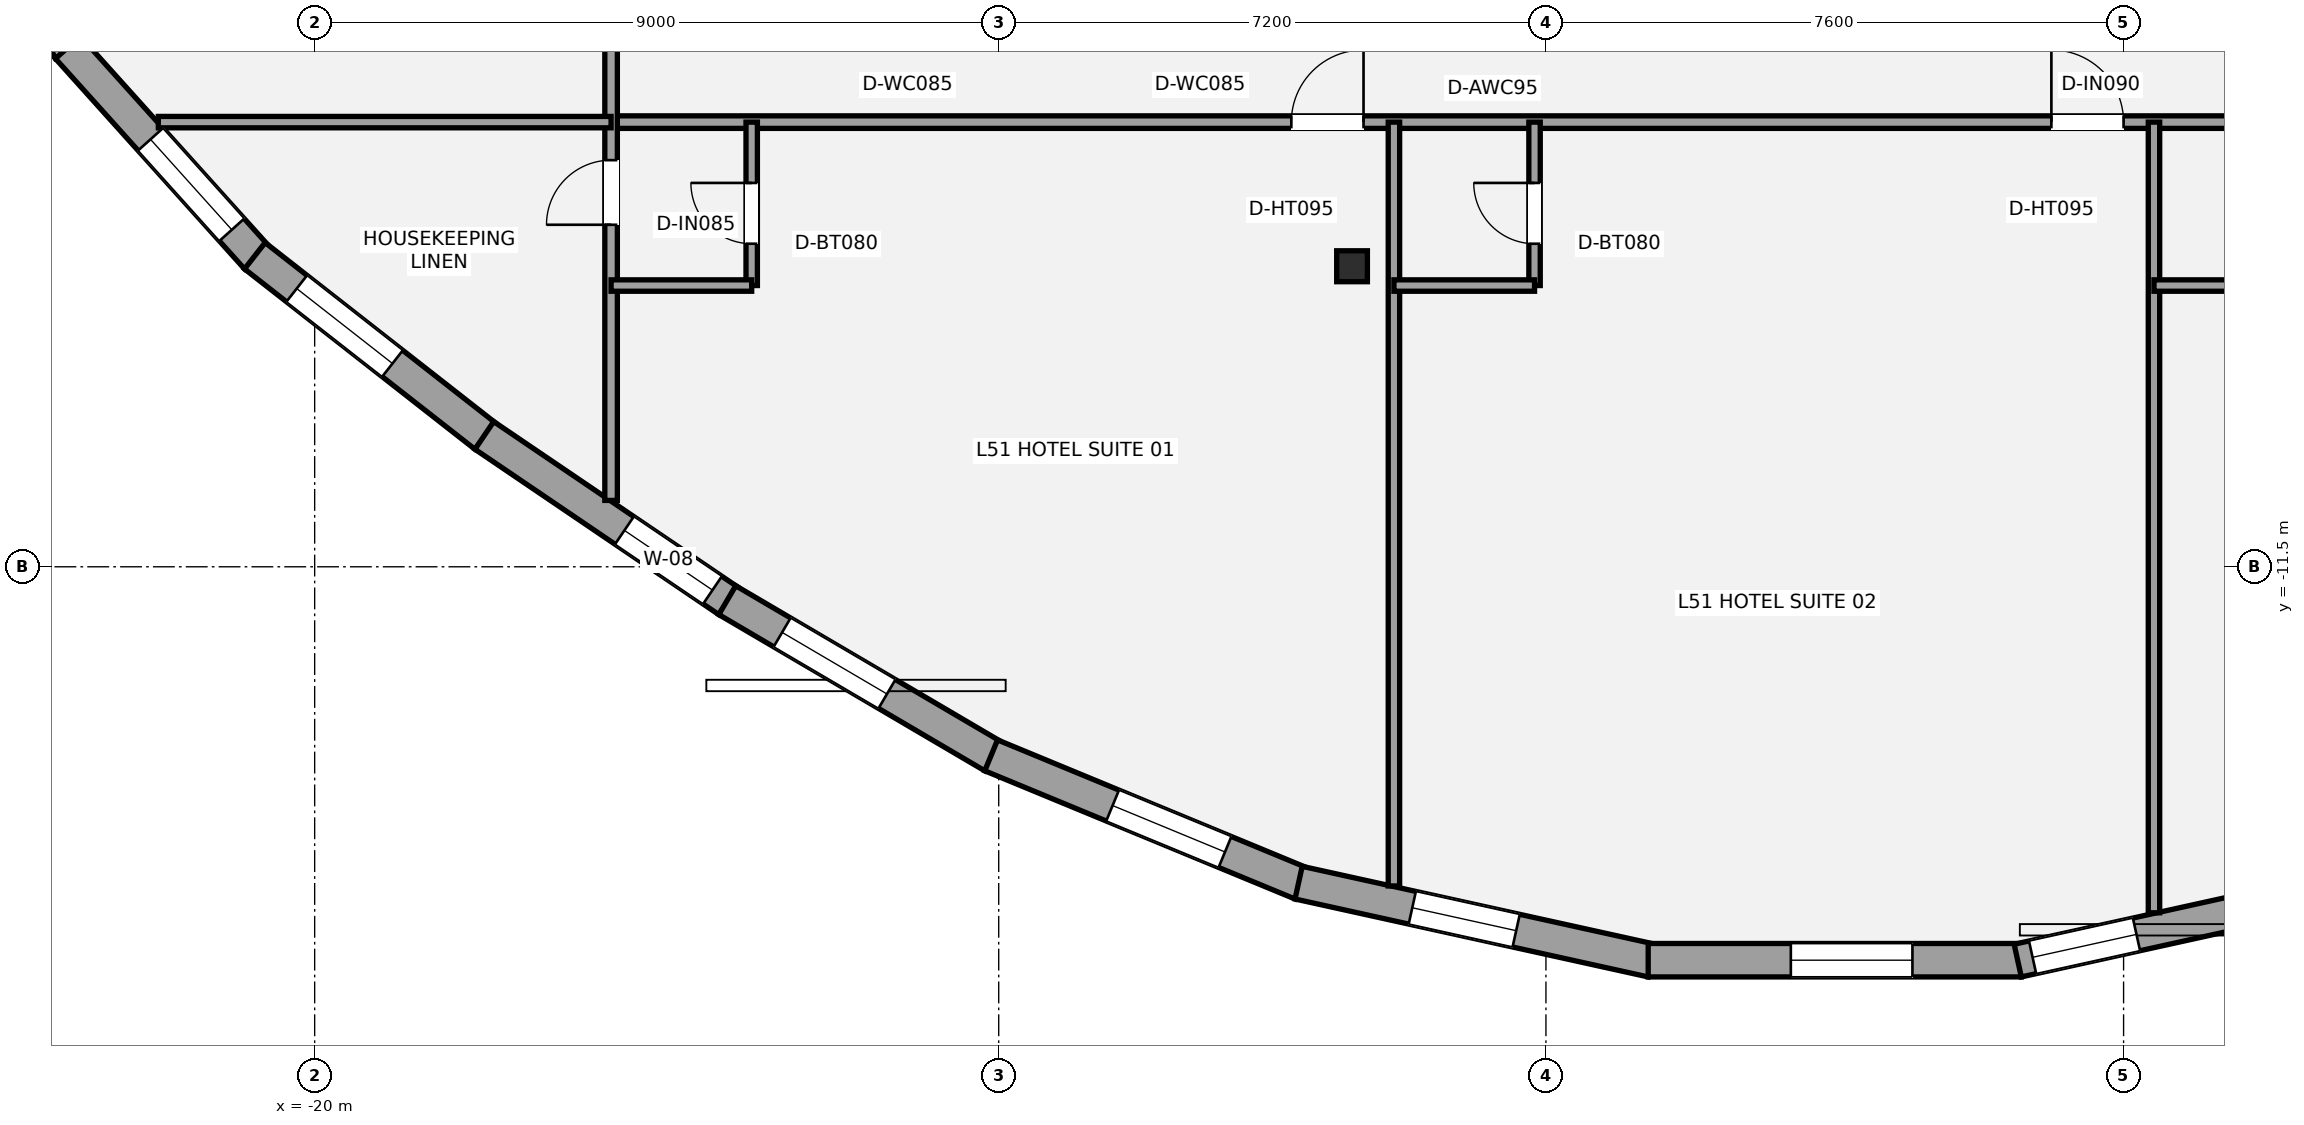
"""IFC4 building model, lengths in metres.
Left out: names, types, materials, properties, quantities, classifications, styles, units other than length and angle.
Written with IfcOpenShell. Run it as: python <this file> out.ifc"""

import sys

from ifc_helpers import new_model, si_unit, direction, frame, frame_2d, origin, origin_2d, place, context, subcontext, project, spatial, rectangle, i_section, extrude, element, fill, save


model = new_model("IFC4")
c1 = context("Model", 3, precision=1e-05, world=origin(), true_north=direction((0.0, 1.0)))
c2 = subcontext(c1, "Body", "Model", "MODEL_VIEW")
j1 = project(units=[si_unit("LENGTHUNIT", "METRE"), si_unit("PLANEANGLEUNIT", "RADIAN")], contexts=[c1])
p1 = place(None, origin())
s1 = spatial("IfcSite", under=j1, at=p1, CompositionType="ELEMENT")
p2 = place(p1, origin())
s2 = spatial("IfcBuilding", under=s1, at=p2, CompositionType="ELEMENT")
p3 = place(p2, frame((0.0, 0.0, 185.4)))
s3 = spatial("IfcBuildingStorey", under=s2, at=p3, CompositionType="ELEMENT", Elevation=185.4)
p4 = place(p3, frame((-6.351, -7.546, 0.0), z_axis=(0.0, 0.0, 1.0), x_axis=(1.0, 0.0, 0.0)))
e1 = element("IfcColumn", 1, at=p4, inside=s3, PredefinedType="COLUMN", context=c2, shape_type="SweptSolid", body=[
    extrude(i_section(OverallWidth=0.404, OverallDepth=0.407, WebThickness=0.027, FlangeThickness=0.044, at=origin_2d()), origin(), (0.0, 0.0, 1.0), 3.2),
])
p5 = place(p3, frame((-23.212, -4.719, 0.0), z_axis=(0.0, 0.0, 1.0), x_axis=(-0.43276286683, 0.90150779314, 0.0)))
e2 = element("IfcWall", 2, at=p5, inside=s3, PredefinedType="STANDARD", context=c2, shape_type="SweptSolid", body=[
    extrude(rectangle(XDim=3.494, YDim=0.44, at=frame_2d((1.747, 0.0))), origin(), (0.0, 0.0, 1.0), 2.315),
])
p6 = place(p5, frame((1.396, 0.0, 0.58)))
e3 = element("IfcOpeningElement", 3, at=p6, cuts=e2, PredefinedType="OPENING", context=c2, shape_type="SweptSolid", body=[
    extrude(rectangle(XDim=1.6, YDim=1.55, at=frame_2d((0.8, 0.775))), frame((0.0, 0.23, 0.0), z_axis=(0.0, -1.0, 0.0), x_axis=(1.0, 0.0, 0.0)), (0.0, 0.0, 1.0), 0.46),
])
p7 = place(p3, frame((-20.759, -7.435, 0.0), z_axis=(0.0, 0.0, 1.0), x_axis=(-0.668547778607, 0.743669192396, 0.0)))
e4 = element("IfcWall", 4, at=p7, inside=s3, PredefinedType="STANDARD", context=c2, shape_type="SweptSolid", body=[
    extrude(rectangle(XDim=3.721, YDim=0.44, at=frame_2d((1.861, 0.0))), origin(), (0.0, 0.0, 1.0), 2.315),
])
p8 = place(p7, frame((0.495, 0.0, 0.58)))
e5 = element("IfcOpeningElement", 5, at=p8, cuts=e4, PredefinedType="OPENING", context=c2, shape_type="SweptSolid", body=[
    extrude(rectangle(XDim=1.6, YDim=1.55, at=frame_2d((0.8, 0.775))), frame((0.0, 0.23, 0.0), z_axis=(0.0, -1.0, 0.0), x_axis=(1.0, 0.0, 0.0)), (0.0, 0.0, 1.0), 0.46),
])
p9 = place(p3, frame((-17.756, -9.781, 0.0), z_axis=(0.0, 0.0, 1.0), x_axis=(-0.787518383176, 0.616291161838, 0.0)))
e6 = element("IfcWall", 6, at=p9, inside=s3, PredefinedType="STANDARD", context=c2, shape_type="SweptSolid", body=[
    extrude(rectangle(XDim=3.85, YDim=0.44, at=frame_2d((1.925, 0.0))), origin(), (0.0, 0.0, 1.0), 2.315),
])
p10 = place(p9, frame((1.55, 0.0, 0.58)))
e7 = element("IfcOpeningElement", 7, at=p10, cuts=e6, PredefinedType="OPENING", context=c2, shape_type="SweptSolid", body=[
    extrude(rectangle(XDim=1.6, YDim=1.55, at=frame_2d((0.8, 0.775))), frame((0.0, 0.23, 0.0), z_axis=(0.0, -1.0, 0.0), x_axis=(1.0, 0.0, 0.0)), (0.0, 0.0, 1.0), 0.46),
])
p11 = place(p3, frame((-14.56, -11.947, 0.0), z_axis=(0.0, 0.0, 1.0), x_axis=(-0.82774221662, 0.561108565988, 0.0)))
e8 = element("IfcWall", 8, at=p11, inside=s3, PredefinedType="STANDARD", context=c2, shape_type="SweptSolid", body=[
    extrude(rectangle(XDim=3.876, YDim=0.44, at=frame_2d((1.938, 0.0))), origin(), (0.0, 0.0, 1.0), 2.315),
])
p12 = place(p11, frame((0.25, 0.0, 0.58)))
e9 = element("IfcOpeningElement", 9, at=p12, cuts=e8, PredefinedType="OPENING", context=c2, shape_type="SweptSolid", body=[
    extrude(rectangle(XDim=1.4, YDim=1.55, at=frame_2d((0.7, 0.775))), frame((0.0, 0.23, 0.0), z_axis=(0.0, -1.0, 0.0), x_axis=(1.0, 0.0, 0.0)), (0.0, 0.0, 1.0), 0.46),
])
p13 = place(p3, frame((-11.072, -13.995, 0.0), z_axis=(0.0, 0.0, 1.0), x_axis=(-0.862269598443, 0.506449542995, 0.0)))
e10 = element("IfcWall", 10, at=p13, inside=s3, PredefinedType="STANDARD", context=c2, shape_type="SweptSolid", body=[
    extrude(rectangle(XDim=4.059, YDim=0.44, at=frame_2d((2.029, 0.0))), origin(), (0.0, 0.0, 1.0), 2.315),
])
p14 = place(p13, frame((1.621, 0.0, 0.58)))
e11 = element("IfcOpeningElement", 11, at=p14, cuts=e10, PredefinedType="OPENING", context=c2, shape_type="SweptSolid", body=[
    extrude(rectangle(XDim=1.6, YDim=1.55, at=frame_2d((0.8, 0.775))), frame((0.0, 0.23, 0.0), z_axis=(0.0, -1.0, 0.0), x_axis=(1.0, 0.0, 0.0)), (0.0, 0.0, 1.0), 0.46),
])
p15 = place(p3, frame((-7.018, -15.667, 0.0), z_axis=(0.0, 0.0, 1.0), x_axis=(-0.924224109839, 0.381850487486, 0.0)))
e12 = element("IfcWall", 12, at=p15, inside=s3, PredefinedType="STANDARD", context=c2, shape_type="SweptSolid", body=[
    extrude(rectangle(XDim=4.417, YDim=0.44, at=frame_2d((2.208, 0.0))), origin(), (0.0, 0.0, 1.0), 2.315),
])
p16 = place(p15, frame((1.088, 0.0, 0.58)))
e13 = element("IfcOpeningElement", 13, at=p16, cuts=e12, PredefinedType="OPENING", context=c2, shape_type="SweptSolid", body=[
    extrude(rectangle(XDim=1.6, YDim=1.55, at=frame_2d((0.8, 0.775))), frame((0.0, 0.23, 0.0), z_axis=(0.0, -1.0, 0.0), x_axis=(1.0, 0.0, 0.0)), (0.0, 0.0, 1.0), 0.46),
])
p17 = place(p3, frame((-2.407, -16.681, 0.0), z_axis=(0.0, 0.0, 1.0), x_axis=(-0.976520281828, 0.215425484049, 0.0)))
e14 = element("IfcWall", 14, at=p17, inside=s3, PredefinedType="STANDARD", context=c2, shape_type="SweptSolid", body=[
    extrude(rectangle(XDim=4.759, YDim=0.44, at=frame_2d((2.379, 0.0))), origin(), (0.0, 0.0, 1.0), 2.315),
])
p18 = place(p17, frame((1.827, 0.0, 0.58)))
e15 = element("IfcOpeningElement", 15, at=p18, cuts=e14, PredefinedType="OPENING", context=c2, shape_type="SweptSolid", body=[
    extrude(rectangle(XDim=1.4, YDim=1.55, at=frame_2d((0.7, 0.775))), frame((0.0, 0.23, 0.0), z_axis=(0.0, -1.0, 0.0), x_axis=(1.0, 0.0, 0.0)), (0.0, 0.0, 1.0), 0.46),
])
p19 = place(p3, frame((2.455, -16.676, 0.0), z_axis=(0.0, 0.0, 1.0), x_axis=(-1.0, 0.0, 0.0)))
e16 = element("IfcWall", 16, at=p19, inside=s3, PredefinedType="STANDARD", context=c2, shape_type="SweptSolid", body=[
    extrude(rectangle(XDim=4.909, YDim=0.44, at=frame_2d((2.455, 0.0))), origin(), (0.0, 0.0, 1.0), 2.315),
])
p20 = place(p19, frame((1.433, 0.0, 0.58)))
e17 = element("IfcOpeningElement", 17, at=p20, cuts=e16, PredefinedType="OPENING", context=c2, shape_type="SweptSolid", body=[
    extrude(rectangle(XDim=1.6, YDim=1.55, at=frame_2d((0.8, 0.775))), frame((0.0, 0.23, 0.0), z_axis=(0.0, -1.0, 0.0), x_axis=(1.0, 0.0, 0.0)), (0.0, 0.0, 1.0), 0.46),
])
p21 = place(p3, frame((7.054, -15.656, 0.0), z_axis=(0.0, 0.0, 1.0), x_axis=(-0.976520281828, -0.215425484049, 0.0)))
e18 = element("IfcWall", 18, at=p21, inside=s3, PredefinedType="STANDARD", context=c2, shape_type="SweptSolid", body=[
    extrude(rectangle(XDim=4.759, YDim=0.44, at=frame_2d((2.379, 0.0))), origin(), (0.0, 0.0, 1.0), 2.315),
])
p22 = place(p21, frame((3.158, 0.0, 0.58)))
e19 = element("IfcOpeningElement", 19, at=p22, cuts=e18, PredefinedType="OPENING", context=c2, shape_type="SweptSolid", body=[
    extrude(rectangle(XDim=1.4, YDim=1.55, at=frame_2d((0.7, 0.775))), frame((0.0, 0.23, 0.0), z_axis=(0.0, -1.0, 0.0), x_axis=(1.0, 0.0, 0.0)), (0.0, 0.0, 1.0), 0.46),
])
p23 = place(p3, frame((-16.1, -5.65, 0.0), z_axis=(0.0, 0.0, 1.0), x_axis=(1.0, 0.0, 0.0)))
e20 = element("IfcWall", 20, at=p23, inside=s3, PredefinedType="PARTITIONING", context=c2, shape_type="SweptSolid", body=[
    extrude(rectangle(XDim=31.65, YDim=0.165, at=frame_2d((15.825, 0.0))), origin(), (0.0, 0.0, 1.0), 2.398),
])
p24 = place(p23, frame((8.95, 0.0, 0.0)))
e21 = element("IfcOpeningElement", 21, at=p24, cuts=e20, PredefinedType="OPENING", context=c2, shape_type="SweptSolid", body=[
    extrude(rectangle(XDim=0.95, YDim=2.15, at=frame_2d((0.475, 1.075))), frame((0.0, 0.093, 0.0), z_axis=(0.0, -1.0, 0.0), x_axis=(1.0, 0.0, 0.0)), (0.0, 0.0, 1.0), 0.185),
])
p25 = place(p23, frame((18.95, 0.0, 0.0)))
e22 = element("IfcOpeningElement", 22, at=p25, cuts=e20, PredefinedType="OPENING", context=c2, shape_type="SweptSolid", body=[
    extrude(rectangle(XDim=0.95, YDim=2.15, at=frame_2d((0.475, 1.075))), frame((0.0, 0.093, 0.0), z_axis=(0.0, -1.0, 0.0), x_axis=(1.0, 0.0, 0.0)), (0.0, 0.0, 1.0), 0.185),
])
p26 = place(p23, frame((30.3, 0.0, 0.0)))
e23 = element("IfcOpeningElement", 23, at=p26, cuts=e20, PredefinedType="OPENING", context=c2, shape_type="SweptSolid", body=[
    extrude(rectangle(XDim=0.95, YDim=2.15, at=frame_2d((0.475, 1.075))), frame((0.0, 0.093, 0.0), z_axis=(0.0, -1.0, 0.0), x_axis=(1.0, 0.0, 0.0)), (0.0, 0.0, 1.0), 0.185),
])
p27 = place(p3, frame((-16.1, -10.627, 0.0), z_axis=(0.0, 0.0, 1.0), x_axis=(0.0, 1.0, 0.0)))
e24 = element("IfcWall", 24, at=p27, inside=s3, PredefinedType="PARTITIONING", context=c2, shape_type="SweptSolid", body=[
    extrude(rectangle(XDim=18.177, YDim=0.165, at=frame_2d((9.088, 0.0))), origin(), (0.0, 0.0, 1.0), 2.473),
])
p28 = place(p27, frame((3.627, 0.0, 0.0)))
e25 = element("IfcOpeningElement", 25, at=p28, cuts=e24, PredefinedType="OPENING", context=c2, shape_type="SweptSolid", body=[
    extrude(rectangle(XDim=0.85, YDim=2.1, at=frame_2d((0.425, 1.05))), frame((0.0, 0.093, 0.0), z_axis=(0.0, -1.0, 0.0), x_axis=(1.0, 0.0, 0.0)), (0.0, 0.0, 1.0), 0.185),
])
p29 = place(p27, frame((6.802, 0.0, 0.0)))
e26 = element("IfcOpeningElement", 26, at=p29, cuts=e24, PredefinedType="OPENING", context=c2, shape_type="SweptSolid", body=[
    extrude(rectangle(XDim=1.0, YDim=2.15, at=frame_2d((0.5, 1.075))), frame((0.0, 0.093, 0.0), z_axis=(0.0, -1.0, 0.0), x_axis=(1.0, 0.0, 0.0)), (0.0, 0.0, 1.0), 0.185),
])
p30 = place(p27, frame((11.227, 0.0, 0.0)))
e27 = element("IfcOpeningElement", 27, at=p30, cuts=e24, PredefinedType="OPENING", context=c2, shape_type="SweptSolid", body=[
    extrude(rectangle(XDim=1.0, YDim=2.15, at=frame_2d((0.5, 1.075))), frame((0.0, 0.093, 0.0), z_axis=(0.0, -1.0, 0.0), x_axis=(1.0, 0.0, 0.0)), (0.0, 0.0, 1.0), 0.185),
])
p31 = place(p27, frame((15.502, 0.0, 0.0)))
e28 = element("IfcOpeningElement", 28, at=p31, cuts=e24, PredefinedType="OPENING", context=c2, shape_type="SweptSolid", body=[
    extrude(rectangle(XDim=1.0, YDim=2.15, at=frame_2d((0.5, 1.075))), frame((0.0, 0.093, 0.0), z_axis=(0.0, -1.0, 0.0), x_axis=(1.0, 0.0, 0.0)), (0.0, 0.0, 1.0), 0.185),
])
p32 = place(p3, frame((-22.057, -5.65, 0.0), z_axis=(0.0, 0.0, 1.0), x_axis=(1.0, 0.0, 0.0)))
e29 = element("IfcWall", 29, at=p32, inside=s3, PredefinedType="PLUMBINGWALL", context=c2, shape_type="SweptSolid", body=[
    extrude(rectangle(XDim=5.957, YDim=0.15, at=frame_2d((2.979, 0.0))), origin(), (0.0, 0.0, 1.0), 2.473),
])
p33 = place(p3, frame((-5.8, -15.699, 0.0), z_axis=(0.0, 0.0, 1.0), x_axis=(0.0, 1.0, 0.0)))
e30 = element("IfcWall", 30, at=p33, inside=s3, PredefinedType="PLUMBINGWALL", context=c2, shape_type="SweptSolid", body=[
    extrude(rectangle(XDim=10.049, YDim=0.15, at=frame_2d((5.025, 0.0))), origin(), (0.0, 0.0, 1.0), 2.473),
])
p34 = place(p3, frame((4.2, -16.052, 0.0), z_axis=(0.0, 0.0, 1.0), x_axis=(0.0, 1.0, 0.0)))
e31 = element("IfcWall", 31, at=p34, inside=s3, PredefinedType="PLUMBINGWALL", context=c2, shape_type="SweptSolid", body=[
    extrude(rectangle(XDim=10.402, YDim=0.15, at=frame_2d((5.201, 0.0))), origin(), (0.0, 0.0, 1.0), 2.473),
])
p35 = place(p3, frame((-14.25, -7.8, 0.0), z_axis=(0.0, 0.0, 1.0), x_axis=(0.0, 1.0, 0.0)))
e32 = element("IfcWall", 32, at=p35, inside=s3, PredefinedType="PLUMBINGWALL", context=c2, shape_type="SweptSolid", body=[
    extrude(rectangle(XDim=2.15, YDim=0.15, at=frame_2d((1.075, 0.0))), origin(), (0.0, 0.0, 1.0), 2.473),
])
p36 = place(p35, frame((0.55, 0.0, 0.0)))
e33 = element("IfcOpeningElement", 33, at=p36, cuts=e32, PredefinedType="OPENING", context=c2, shape_type="SweptSolid", body=[
    extrude(rectangle(XDim=0.8, YDim=2.1, at=frame_2d((0.4, 1.05))), frame((0.0, 0.085, 0.0), z_axis=(0.0, -1.0, 0.0), x_axis=(1.0, 0.0, 0.0)), (0.0, 0.0, 1.0), 0.17),
])
p37 = place(p3, frame((-16.1, -7.8, 0.0), z_axis=(0.0, 0.0, 1.0), x_axis=(1.0, 0.0, 0.0)))
e34 = element("IfcWall", 34, at=p37, inside=s3, PredefinedType="PLUMBINGWALL", context=c2, shape_type="SweptSolid", body=[
    extrude(rectangle(XDim=1.85, YDim=0.15, at=frame_2d((0.925, 0.0))), origin(), (0.0, 0.0, 1.0), 2.473),
])
p38 = place(p3, frame((-3.95, -7.8, 0.0), z_axis=(0.0, 0.0, 1.0), x_axis=(0.0, 1.0, 0.0)))
e35 = element("IfcWall", 35, at=p38, inside=s3, PredefinedType="PLUMBINGWALL", context=c2, shape_type="SweptSolid", body=[
    extrude(rectangle(XDim=2.15, YDim=0.15, at=frame_2d((1.075, 0.0))), origin(), (0.0, 0.0, 1.0), 2.473),
])
p39 = place(p38, frame((0.55, 0.0, 0.0)))
e36 = element("IfcOpeningElement", 36, at=p39, cuts=e35, PredefinedType="OPENING", context=c2, shape_type="SweptSolid", body=[
    extrude(rectangle(XDim=0.8, YDim=2.1, at=frame_2d((0.4, 1.05))), frame((0.0, 0.085, 0.0), z_axis=(0.0, -1.0, 0.0), x_axis=(1.0, 0.0, 0.0)), (0.0, 0.0, 1.0), 0.17),
])
for number, where, z_axis, x_axis in (
    (37, (-5.8, -7.8, 0.0), (0.0, 0.0, 1.0), (1.0, 0.0, 0.0)),
    (38, (4.2, -7.8, 0.0), (0.0, 0.0, 1.0), (1.0, 0.0, 0.0)),
):
    element("IfcWall", number, at=place(p3, frame(where, z_axis=z_axis, x_axis=x_axis)), inside=s3, PredefinedType="PLUMBINGWALL", context=c2, shape_type="SweptSolid", body=[
        extrude(rectangle(XDim=1.85, YDim=0.15, at=frame_2d((0.925, 0.0))), origin(), (0.0, 0.0, 1.0), 3.02),
    ])
p40 = place(p8, origin())
e39 = element("IfcWindow", 39, at=p40, inside=s3, PartitioningType="SINGLE_PANEL", PredefinedType="WINDOW", context=c2, shape_type="SweptSolid", body=[
    extrude(rectangle(XDim=1.6, YDim=1.55, at=frame_2d((0.8, 0.775))), frame((0.0, -0.01, 0.0), z_axis=(0.0, -1.0, 0.0), x_axis=(1.0, 0.0, 0.0)), (0.0, 0.0, 1.0), 0.06),
])
fill(e5, e39)
p41 = place(p10, origin())
e40 = element("IfcWindow", 40, at=p41, inside=s3, PartitioningType="SINGLE_PANEL", PredefinedType="WINDOW", context=c2, shape_type="SweptSolid", body=[
    extrude(rectangle(XDim=1.6, YDim=1.55, at=frame_2d((0.8, 0.775))), frame((0.0, -0.01, 0.0), z_axis=(0.0, -1.0, 0.0), x_axis=(1.0, 0.0, 0.0)), (0.0, 0.0, 1.0), 0.06),
])
fill(e7, e40)
p42 = place(p12, origin())
e41 = element("IfcWindow", 41, at=p42, inside=s3, PartitioningType="SINGLE_PANEL", PredefinedType="WINDOW", context=c2, shape_type="SweptSolid", body=[
    extrude(rectangle(XDim=1.4, YDim=1.55, at=frame_2d((0.7, 0.775))), frame((0.0, -0.01, 0.0), z_axis=(0.0, -1.0, 0.0), x_axis=(1.0, 0.0, 0.0)), (0.0, 0.0, 1.0), 0.06),
])
fill(e9, e41)
p43 = place(p14, origin())
e42 = element("IfcWindow", 42, at=p43, inside=s3, PartitioningType="SINGLE_PANEL", PredefinedType="WINDOW", context=c2, shape_type="SweptSolid", body=[
    extrude(rectangle(XDim=1.6, YDim=1.55, at=frame_2d((0.8, 0.775))), frame((0.0, -0.01, 0.0), z_axis=(0.0, -1.0, 0.0), x_axis=(1.0, 0.0, 0.0)), (0.0, 0.0, 1.0), 0.06),
])
fill(e11, e42)
p44 = place(p16, origin())
e43 = element("IfcWindow", 43, at=p44, inside=s3, PartitioningType="SINGLE_PANEL", PredefinedType="WINDOW", context=c2, shape_type="SweptSolid", body=[
    extrude(rectangle(XDim=1.6, YDim=1.55, at=frame_2d((0.8, 0.775))), frame((0.0, -0.01, 0.0), z_axis=(0.0, -1.0, 0.0), x_axis=(1.0, 0.0, 0.0)), (0.0, 0.0, 1.0), 0.06),
])
fill(e13, e43)
p45 = place(p18, origin())
e44 = element("IfcWindow", 44, at=p45, inside=s3, PartitioningType="SINGLE_PANEL", PredefinedType="WINDOW", context=c2, shape_type="SweptSolid", body=[
    extrude(rectangle(XDim=1.4, YDim=1.55, at=frame_2d((0.7, 0.775))), frame((0.0, -0.01, 0.0), z_axis=(0.0, -1.0, 0.0), x_axis=(1.0, 0.0, 0.0)), (0.0, 0.0, 1.0), 0.06),
])
fill(e15, e44)
p46 = place(p20, origin())
e45 = element("IfcWindow", 45, at=p46, inside=s3, PartitioningType="SINGLE_PANEL", PredefinedType="WINDOW", context=c2, shape_type="SweptSolid", body=[
    extrude(rectangle(XDim=1.6, YDim=1.55, at=frame_2d((0.8, 0.775))), frame((0.0, -0.01, 0.0), z_axis=(0.0, -1.0, 0.0), x_axis=(1.0, 0.0, 0.0)), (0.0, 0.0, 1.0), 0.06),
])
fill(e17, e45)
p47 = place(p22, origin())
e46 = element("IfcWindow", 46, at=p47, inside=s3, PartitioningType="SINGLE_PANEL", PredefinedType="WINDOW", context=c2, shape_type="SweptSolid", body=[
    extrude(rectangle(XDim=1.4, YDim=1.55, at=frame_2d((0.7, 0.775))), frame((0.0, -0.01, 0.0), z_axis=(0.0, -1.0, 0.0), x_axis=(1.0, 0.0, 0.0)), (0.0, 0.0, 1.0), 0.06),
])
fill(e19, e46)
p48 = place(p28, origin())
e47 = element("IfcDoor", 47, at=p48, inside=s3, OperationType="SINGLE_SWING_LEFT", PredefinedType="DOOR", context=c2, shape_type="SweptSolid", body=[
    extrude(rectangle(XDim=0.85, YDim=2.1, at=frame_2d((0.425, 1.05))), frame((0.0, 0.025, 0.0), z_axis=(0.0, -1.0, 0.0), x_axis=(1.0, 0.0, 0.0)), (0.0, 0.0, 1.0), 0.05),
])
fill(e25, e47)
p49 = place(p24, origin())
e48 = element("IfcDoor", 48, at=p49, inside=s3, OperationType="SINGLE_SWING_RIGHT", PredefinedType="DOOR", context=c2, shape_type="SweptSolid", body=[
    extrude(rectangle(XDim=0.95, YDim=2.15, at=frame_2d((0.475, 1.075))), frame((0.0, 0.025, 0.0), z_axis=(0.0, -1.0, 0.0), x_axis=(1.0, 0.0, 0.0)), (0.0, 0.0, 1.0), 0.05),
])
fill(e21, e48)
p50 = place(p36, origin())
e49 = element("IfcDoor", 49, at=p50, inside=s3, OperationType="SINGLE_SWING_RIGHT", PredefinedType="DOOR", context=c2, shape_type="SweptSolid", body=[
    extrude(rectangle(XDim=0.8, YDim=2.1, at=frame_2d((0.4, 1.05))), frame((0.0, 0.025, 0.0), z_axis=(0.0, -1.0, 0.0), x_axis=(1.0, 0.0, 0.0)), (0.0, 0.0, 1.0), 0.05),
])
fill(e33, e49)
p51 = place(p25, origin())
e50 = element("IfcDoor", 50, at=p51, inside=s3, OperationType="SINGLE_SWING_LEFT", PredefinedType="DOOR", context=c2, shape_type="SweptSolid", body=[
    extrude(rectangle(XDim=0.95, YDim=2.15, at=frame_2d((0.475, 1.075))), frame((0.0, 0.025, 0.0), z_axis=(0.0, -1.0, 0.0), x_axis=(1.0, 0.0, 0.0)), (0.0, 0.0, 1.0), 0.05),
])
fill(e22, e50)
p52 = place(p39, origin())
e51 = element("IfcDoor", 51, at=p52, inside=s3, OperationType="SINGLE_SWING_RIGHT", PredefinedType="DOOR", context=c2, shape_type="SweptSolid", body=[
    extrude(rectangle(XDim=0.8, YDim=2.1, at=frame_2d((0.4, 1.05))), frame((0.0, 0.025, 0.0), z_axis=(0.0, -1.0, 0.0), x_axis=(1.0, 0.0, 0.0)), (0.0, 0.0, 1.0), 0.05),
])
fill(e36, e51)
save(model, sys.argv[1])
